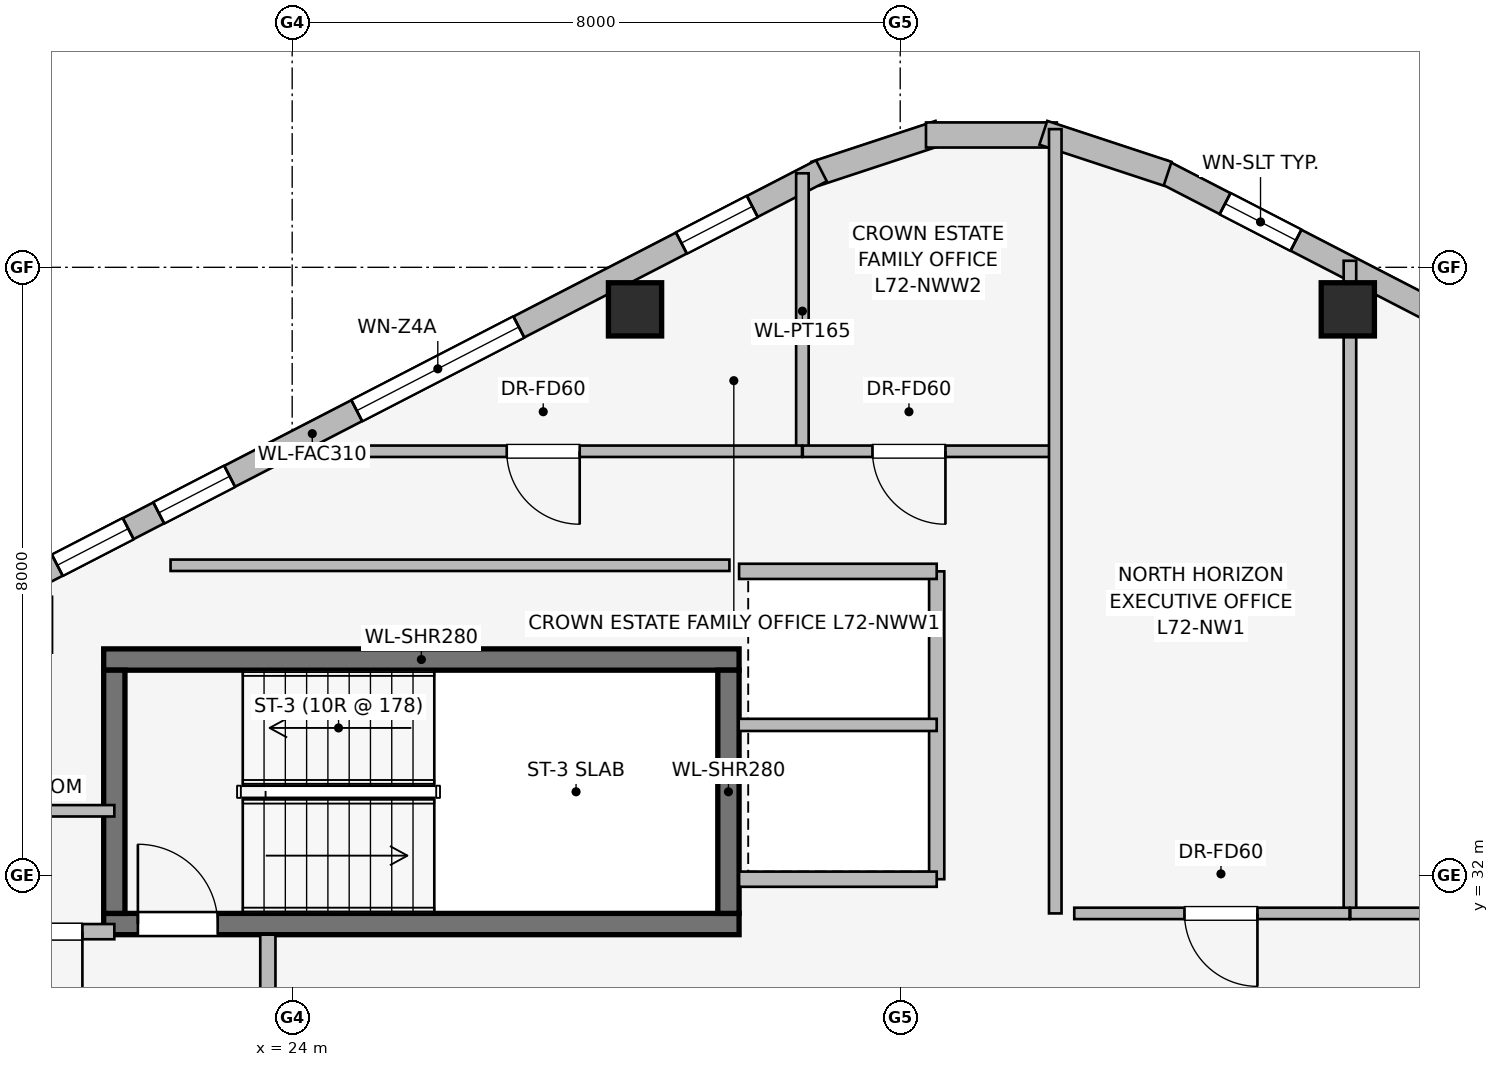
"""IFC4 building model, lengths in metres.
Left out: names, types, materials, properties, quantities, classifications, styles, units other than length and angle.
Written with IfcOpenShell. Run it as: python <this file> out.ifc"""

import sys

from ifc_helpers import new_model, si_unit, direction, frame, frame_2d, origin, origin_2d, place, context, subcontext, project, spatial, rectangle, extrude, element, fill, save


model = new_model("IFC4")
c1 = context("Model", 3, precision=1e-05, world=origin(), true_north=direction((0.0, 1.0)))
c2 = subcontext(c1, "Body", "Model", "MODEL_VIEW")
j1 = project(units=[si_unit("LENGTHUNIT", "METRE"), si_unit("PLANEANGLEUNIT", "RADIAN")], contexts=[c1])
p1 = place(None, origin())
s1 = spatial("IfcSite", under=j1, at=p1, CompositionType="ELEMENT")
p2 = place(p1, origin())
s2 = spatial("IfcBuilding", under=s1, at=p2, CompositionType="ELEMENT")
p3 = place(p2, frame((0.0, 0.0, 263.2)))
s3 = spatial("IfcBuildingStorey", under=s2, at=p3, CompositionType="ELEMENT", Elevation=263.2)
p4 = place(p3, frame((21.52, 31.36, 0.0), z_axis=(0.0, 0.0, 1.0), x_axis=(1.0, 0.0, 0.0)))
e1 = element("IfcWall", 1, at=p4, inside=s3, PredefinedType="SHEAR", context=c2, shape_type="SweptSolid", body=[
    extrude(rectangle(XDim=8.36, YDim=0.28, at=frame_2d((4.18, 0.0))), origin(), (0.0, 0.0, 1.0), 3.55),
])
p5 = place(p4, frame((0.45, 0.0, 0.0)))
e2 = element("IfcOpeningElement", 2, at=p5, cuts=e1, PredefinedType="OPENING", context=c2, shape_type="SweptSolid", body=[
    extrude(rectangle(XDim=1.05, YDim=2.0, at=frame_2d((0.525, 1.0))), frame((0.0, 0.15, 0.0), z_axis=(0.0, -1.0, 0.0), x_axis=(1.0, 0.0, 0.0)), (0.0, 0.0, 1.0), 0.3),
])
p6 = place(p3, frame((29.88, 34.84, 0.0), z_axis=(0.0, 0.0, 1.0), x_axis=(-1.0, 0.0, 0.0)))
e3 = element("IfcWall", 3, at=p6, inside=s3, PredefinedType="SHEAR", context=c2, shape_type="SweptSolid", body=[
    extrude(rectangle(XDim=8.36, YDim=0.28, at=frame_2d((4.18, 0.0))), origin(), (0.0, 0.0, 1.0), 3.55),
])
for number, where, z_axis, x_axis in (
    (4, (21.66, 34.7, 0.0), (0.0, 0.0, 1.0), (0.0, -1.0, 0.0)),
    (5, (29.74, 31.5, 0.0), (0.0, 0.0, 1.0), (0.0, 1.0, 0.0)),
):
    element("IfcWall", number, at=place(p3, frame(where, z_axis=z_axis, x_axis=x_axis)), inside=s3, PredefinedType="SHEAR", context=c2, shape_type="SweptSolid", body=[
        extrude(rectangle(XDim=3.2, YDim=0.28, at=frame_2d((1.6, 0.0))), origin(), (0.0, 0.0, 1.0), 3.55),
    ])
for number, where, z_axis, x_axis in (
    (6, (37.889, 39.447, 0.0), (0.0, 0.0, 1.0), (1.0, 0.0, 0.0)),
    (7, (28.511, 39.447, 0.0), (0.0, 0.0, 1.0), (1.0, 0.0, 0.0)),
):
    element("IfcColumn", number, at=place(p3, frame(where, z_axis=z_axis, x_axis=x_axis)), inside=s3, PredefinedType="COLUMN", context=c2, shape_type="SweptSolid", body=[
        extrude(rectangle(XDim=0.7, YDim=0.7, at=origin_2d()), origin(), (0.0, 0.0, 1.0), 3.55),
    ])
p7 = place(p3, frame((35.437, 41.27, 0.0), z_axis=(0.0, 0.0, 1.0), x_axis=(0.888581481622, -0.458718814218, 0.0)))
e8 = element("IfcWall", 8, at=p7, inside=s3, PredefinedType="STANDARD", context=c2, shape_type="SweptSolid", body=[
    extrude(rectangle(XDim=15.077, YDim=0.31, at=frame_2d((7.539, 0.0))), origin(), (0.0, 0.0, 1.0), 3.29),
])
p8 = place(p7, frame((0.942, 0.0, 0.75)))
e9 = element("IfcOpeningElement", 9, at=p8, cuts=e8, PredefinedType="OPENING", context=c2, shape_type="SweptSolid", body=[
    extrude(rectangle(XDim=1.05, YDim=1.4, at=frame_2d((0.525, 0.7))), frame((0.0, 0.165, 0.0), z_axis=(0.0, -1.0, 0.0), x_axis=(1.0, 0.0, 0.0)), (0.0, 0.0, 1.0), 0.33),
])
p9 = place(p7, frame((4.344, 0.0, 0.75)))
e10 = element("IfcOpeningElement", 10, at=p9, cuts=e8, PredefinedType="OPENING", context=c2, shape_type="SweptSolid", body=[
    extrude(rectangle(XDim=1.05, YDim=1.4, at=frame_2d((0.525, 0.7))), frame((0.0, 0.165, 0.0), z_axis=(0.0, -1.0, 0.0), x_axis=(1.0, 0.0, 0.0)), (0.0, 0.0, 1.0), 0.33),
])
p10 = place(p7, frame((7.013, 0.0, 0.75)))
e11 = element("IfcOpeningElement", 11, at=p10, cuts=e8, PredefinedType="OPENING", context=c2, shape_type="SweptSolid", body=[
    extrude(rectangle(XDim=1.05, YDim=1.4, at=frame_2d((0.525, 0.7))), frame((0.0, 0.165, 0.0), z_axis=(0.0, -1.0, 0.0), x_axis=(1.0, 0.0, 0.0)), (0.0, 0.0, 1.0), 0.33),
])
p11 = place(p7, frame((9.681, 0.0, 0.75)))
e12 = element("IfcOpeningElement", 12, at=p11, cuts=e8, PredefinedType="OPENING", context=c2, shape_type="SweptSolid", body=[
    extrude(rectangle(XDim=1.05, YDim=1.4, at=frame_2d((0.525, 0.7))), frame((0.0, 0.165, 0.0), z_axis=(0.0, -1.0, 0.0), x_axis=(1.0, 0.0, 0.0)), (0.0, 0.0, 1.0), 0.33),
])
p12 = place(p7, frame((13.029, 0.0, 0.75)))
e13 = element("IfcOpeningElement", 13, at=p12, cuts=e8, PredefinedType="OPENING", context=c2, shape_type="SweptSolid", body=[
    extrude(rectangle(XDim=1.05, YDim=1.4, at=frame_2d((0.525, 0.7))), frame((0.0, 0.165, 0.0), z_axis=(0.0, -1.0, 0.0), x_axis=(1.0, 0.0, 0.0)), (0.0, 0.0, 1.0), 0.33),
])
p13 = place(p3, frame((30.882, 41.231, 0.0), z_axis=(0.0, 0.0, 1.0), x_axis=(0.949713440491, 0.313120393699, 0.0)))
e14 = element("IfcWall", 14, at=p13, inside=s3, PredefinedType="STANDARD", context=c2, shape_type="SweptSolid", body=[
    extrude(rectangle(XDim=1.722, YDim=0.33, at=frame_2d((0.861, 0.0))), origin(), (0.0, 0.0, 1.0), 3.29),
])
p14 = place(p3, frame((32.339, 41.741, 0.0), z_axis=(0.0, 0.0, 1.0), x_axis=(1.0, 0.0, 0.0)))
e15 = element("IfcWall", 15, at=p14, inside=s3, PredefinedType="STANDARD", context=c2, shape_type="SweptSolid", body=[
    extrude(rectangle(XDim=1.722, YDim=0.33, at=frame_2d((0.861, 0.0))), origin(), (0.0, 0.0, 1.0), 3.29),
])
p15 = place(p3, frame((33.883, 41.77, 0.0), z_axis=(0.0, 0.0, 1.0), x_axis=(0.949713440491, -0.313120393699, 0.0)))
e16 = element("IfcWall", 16, at=p15, inside=s3, PredefinedType="STANDARD", context=c2, shape_type="SweptSolid", body=[
    extrude(rectangle(XDim=1.722, YDim=0.33, at=frame_2d((0.861, 0.0))), origin(), (0.0, 0.0, 1.0), 3.29),
])
p16 = place(p3, frame((17.566, 34.354, 0.0), z_axis=(0.0, 0.0, 1.0), x_axis=(0.888581481622, 0.458718814218, 0.0)))
e17 = element("IfcWall", 17, at=p16, inside=s3, PredefinedType="STANDARD", context=c2, shape_type="SweptSolid", body=[
    extrude(rectangle(XDim=15.077, YDim=0.31, at=frame_2d((7.539, 0.0))), origin(), (0.0, 0.0, 1.0), 3.29),
])
p17 = place(p16, frame((0.998, 0.0, 0.75)))
e18 = element("IfcOpeningElement", 18, at=p17, cuts=e17, PredefinedType="OPENING", context=c2, shape_type="SweptSolid", body=[
    extrude(rectangle(XDim=1.05, YDim=1.4, at=frame_2d((0.525, 0.7))), frame((0.0, 0.165, 0.0), z_axis=(0.0, -1.0, 0.0), x_axis=(1.0, 0.0, 0.0)), (0.0, 0.0, 1.0), 0.33),
])
p18 = place(p16, frame((3.763, 0.0, 0.75)))
e19 = element("IfcOpeningElement", 19, at=p18, cuts=e17, PredefinedType="OPENING", context=c2, shape_type="SweptSolid", body=[
    extrude(rectangle(XDim=1.05, YDim=1.4, at=frame_2d((0.525, 0.7))), frame((0.0, 0.165, 0.0), z_axis=(0.0, -1.0, 0.0), x_axis=(1.0, 0.0, 0.0)), (0.0, 0.0, 1.0), 0.33),
])
p19 = place(p16, frame((5.265, 0.0, 0.75)))
e20 = element("IfcOpeningElement", 20, at=p19, cuts=e17, PredefinedType="OPENING", context=c2, shape_type="SweptSolid", body=[
    extrude(rectangle(XDim=1.05, YDim=1.4, at=frame_2d((0.525, 0.7))), frame((0.0, 0.165, 0.0), z_axis=(0.0, -1.0, 0.0), x_axis=(1.0, 0.0, 0.0)), (0.0, 0.0, 1.0), 0.33),
])
p20 = place(p16, frame((8.197, 0.0, 0.75)))
e21 = element("IfcOpeningElement", 21, at=p20, cuts=e17, PredefinedType="OPENING", context=c2, shape_type="SweptSolid", body=[
    extrude(rectangle(XDim=2.4, YDim=1.6, at=frame_2d((1.2, 0.8))), frame((0.0, 0.165, 0.0), z_axis=(0.0, -1.0, 0.0), x_axis=(1.0, 0.0, 0.0)), (0.0, 0.0, 1.0), 0.33),
])
p21 = place(p16, frame((13.004, 0.0, 0.75)))
e22 = element("IfcOpeningElement", 22, at=p21, cuts=e17, PredefinedType="OPENING", context=c2, shape_type="SweptSolid", body=[
    extrude(rectangle(XDim=1.05, YDim=1.4, at=frame_2d((0.525, 0.7))), frame((0.0, 0.165, 0.0), z_axis=(0.0, -1.0, 0.0), x_axis=(1.0, 0.0, 0.0)), (0.0, 0.0, 1.0), 0.33),
])
p22 = place(p3, frame((23.68, 25.68, 0.0), z_axis=(0.0, 0.0, 1.0), x_axis=(0.0, 1.0, 0.0)))
e23 = element("IfcWall", 23, at=p22, inside=s3, PredefinedType="PARTITIONING", context=c2, shape_type="SweptSolid", body=[
    extrude(rectangle(XDim=5.54, YDim=0.2, at=frame_2d((2.77, 0.0))), origin(), (0.0, 0.0, 1.0), 3.29),
])
p23 = place(p22, frame((1.8, 0.0, 0.0)))
e24 = element("IfcOpeningElement", 24, at=p23, cuts=e23, PredefinedType="OPENING", context=c2, shape_type="SweptSolid", body=[
    extrude(rectangle(XDim=1.05, YDim=2.0, at=frame_2d((0.525, 1.0))), frame((0.0, 0.11, 0.0), z_axis=(0.0, -1.0, 0.0), x_axis=(1.0, 0.0, 0.0)), (0.0, 0.0, 1.0), 0.22),
])
p24 = place(p3, frame((21.66, 31.26, 0.0), z_axis=(0.0, 0.0, 1.0), x_axis=(-1.0, 0.0, 0.0)))
e25 = element("IfcWall", 25, at=p24, inside=s3, PredefinedType="PARTITIONING", context=c2, shape_type="SweptSolid", body=[
    extrude(rectangle(XDim=2.01, YDim=0.2, at=frame_2d((1.005, 0.0))), origin(), (0.0, 0.0, 1.0), 3.29),
])
p25 = place(p24, frame((0.42, 0.0, 0.0)))
e26 = element("IfcOpeningElement", 26, at=p25, cuts=e25, PredefinedType="OPENING", context=c2, shape_type="SweptSolid", body=[
    extrude(rectangle(XDim=0.86, YDim=2.0, at=frame_2d((0.43, 1.0))), frame((0.0, 0.11, 0.0), z_axis=(0.0, -1.0, 0.0), x_axis=(1.0, 0.0, 0.0)), (0.0, 0.0, 1.0), 0.22),
])
p26 = place(p3, frame((32.48, 31.95, 0.0), z_axis=(0.0, 0.0, 1.0), x_axis=(0.0, 1.0, 0.0)))
e27 = element("IfcWall", 27, at=p26, inside=s3, PredefinedType="PARTITIONING", context=c2, shape_type="SweptSolid", body=[
    extrude(rectangle(XDim=4.05, YDim=0.2, at=frame_2d((2.025, 0.0))), origin(), (0.0, 0.0, 1.0), 3.29),
])
for number, where, z_axis, x_axis in (
    (28, (29.88, 36.0, 0.0), (0.0, 0.0, 1.0), (1.0, 0.0, 0.0)),
    (29, (32.48, 31.95, 0.0), (0.0, 0.0, 1.0), (-1.0, 0.0, 0.0)),
):
    element("IfcWall", number, at=place(p3, frame(where, z_axis=z_axis, x_axis=x_axis)), inside=s3, PredefinedType="PARTITIONING", context=c2, shape_type="SweptSolid", body=[
        extrude(rectangle(XDim=2.6, YDim=0.2, at=frame_2d((1.3, 0.0))), origin(), (0.0, 0.0, 1.0), 3.29),
    ])
p27 = place(p3, frame((29.875, 33.98, 0.0), z_axis=(0.0, 0.0, 1.0), x_axis=(1.0, 0.0, 0.0)))
e30 = element("IfcWall", 30, at=p27, inside=s3, PredefinedType="PARTITIONING", context=c2, shape_type="SweptSolid", body=[
    extrude(rectangle(XDim=2.605, YDim=0.16, at=frame_2d((1.302, 0.0))), origin(), (0.0, 0.0, 1.0), 3.29),
])
p28 = place(p3, frame((21.66, 32.85, 0.0), z_axis=(0.0, 0.0, 1.0), x_axis=(-1.0, 0.0, 0.0)))
e31 = element("IfcWall", 31, at=p28, inside=s3, PredefinedType="PARTITIONING", context=c2, shape_type="SweptSolid", body=[
    extrude(rectangle(XDim=1.71, YDim=0.15, at=frame_2d((0.855, 0.0))), origin(), (0.0, 0.0, 1.0), 3.29),
])
p29 = place(p3, frame((30.713, 37.61, 0.0), z_axis=(0.0, 0.0, 1.0), x_axis=(0.0, 1.0, 0.0)))
e32 = element("IfcWall", 32, at=p29, inside=s3, PredefinedType="PARTITIONING", context=c2, shape_type="SweptSolid", body=[
    extrude(rectangle(XDim=3.627, YDim=0.165, at=frame_2d((1.813, 0.0))), origin(), (0.0, 0.0, 1.0), 3.29),
])
p30 = place(p3, frame((30.708, 37.58, 0.0), z_axis=(0.0, 0.0, 1.0), x_axis=(-1.0, 0.0, 0.0)))
e33 = element("IfcWall", 33, at=p30, inside=s3, PredefinedType="PARTITIONING", context=c2, shape_type="SweptSolid", body=[
    extrude(rectangle(XDim=7.046, YDim=0.15, at=frame_2d((3.523, 0.0))), origin(), (0.0, 0.0, 1.0), 2.682),
])
p31 = place(p30, frame((2.925, 0.0, 0.0)))
e34 = element("IfcOpeningElement", 34, at=p31, cuts=e33, PredefinedType="OPENING", context=c2, shape_type="SweptSolid", body=[
    extrude(rectangle(XDim=0.96, YDim=2.0, at=frame_2d((0.48, 1.0))), frame((0.0, 0.085, 0.0), z_axis=(0.0, -1.0, 0.0), x_axis=(1.0, 0.0, 0.0)), (0.0, 0.0, 1.0), 0.17),
])
p32 = place(p3, frame((33.962, 37.58, 0.0), z_axis=(0.0, 0.0, 1.0), x_axis=(-1.0, 0.0, 0.0)))
e35 = element("IfcWall", 35, at=p32, inside=s3, PredefinedType="PARTITIONING", context=c2, shape_type="SweptSolid", body=[
    extrude(rectangle(XDim=3.244, YDim=0.15, at=frame_2d((1.622, 0.0))), origin(), (0.0, 0.0, 1.0), 3.29),
])
p33 = place(p32, frame((1.367, 0.0, 0.0)))
e36 = element("IfcOpeningElement", 36, at=p33, cuts=e35, PredefinedType="OPENING", context=c2, shape_type="SweptSolid", body=[
    extrude(rectangle(XDim=0.96, YDim=2.0, at=frame_2d((0.48, 1.0))), frame((0.0, 0.085, 0.0), z_axis=(0.0, -1.0, 0.0), x_axis=(1.0, 0.0, 0.0)), (0.0, 0.0, 1.0), 0.17),
])
p34 = place(p3, frame((34.04, 31.5, 0.0), z_axis=(0.0, 0.0, 1.0), x_axis=(0.0, 1.0, 0.0)))
e37 = element("IfcWall", 37, at=p34, inside=s3, PredefinedType="PARTITIONING", context=c2, shape_type="SweptSolid", body=[
    extrude(rectangle(XDim=10.318, YDim=0.165, at=frame_2d((5.159, 0.0))), origin(), (0.0, 0.0, 1.0), 3.29),
])
p35 = place(p3, frame((37.917, 31.51, 0.0), z_axis=(0.0, 0.0, 1.0), x_axis=(0.0, 1.0, 0.0)))
e38 = element("IfcWall", 38, at=p35, inside=s3, PredefinedType="PARTITIONING", context=c2, shape_type="SweptSolid", body=[
    extrude(rectangle(XDim=8.576, YDim=0.165, at=frame_2d((4.288, 0.0))), origin(), (0.0, 0.0, 1.0), 2.679),
])
p36 = place(p3, frame((37.912, 31.5, 0.0), z_axis=(0.0, 0.0, 1.0), x_axis=(-1.0, 0.0, 0.0)))
e39 = element("IfcWall", 39, at=p36, inside=s3, PredefinedType="PARTITIONING", context=c2, shape_type="SweptSolid", body=[
    extrude(rectangle(XDim=3.622, YDim=0.15, at=frame_2d((1.811, 0.0))), origin(), (0.0, 0.0, 1.0), 3.29),
])
p37 = place(p36, frame((1.212, 0.0, 0.0)))
e40 = element("IfcOpeningElement", 40, at=p37, cuts=e39, PredefinedType="OPENING", context=c2, shape_type="SweptSolid", body=[
    extrude(rectangle(XDim=0.96, YDim=2.0, at=frame_2d((0.48, 1.0))), frame((0.0, 0.085, 0.0), z_axis=(0.0, -1.0, 0.0), x_axis=(1.0, 0.0, 0.0)), (0.0, 0.0, 1.0), 0.17),
])
p38 = place(p3, frame((41.45, 31.5, 0.0), z_axis=(0.0, 0.0, 1.0), x_axis=(-1.0, 0.0, 0.0)))
e41 = element("IfcWall", 41, at=p38, inside=s3, PredefinedType="PARTITIONING", context=c2, shape_type="SweptSolid", body=[
    extrude(rectangle(XDim=3.528, YDim=0.15, at=frame_2d((1.764, 0.0))), origin(), (0.0, 0.0, 1.0), 3.29),
])
p39 = place(p38, frame((1.524, 0.0, 0.0)))
e42 = element("IfcOpeningElement", 42, at=p39, cuts=e41, PredefinedType="OPENING", context=c2, shape_type="SweptSolid", body=[
    extrude(rectangle(XDim=0.96, YDim=2.0, at=frame_2d((0.48, 1.0))), frame((0.0, 0.085, 0.0), z_axis=(0.0, -1.0, 0.0), x_axis=(1.0, 0.0, 0.0)), (0.0, 0.0, 1.0), 0.17),
])
p40 = place(p3, frame((29.753, 36.08, 0.0), z_axis=(0.0, 0.0, 1.0), x_axis=(-1.0, 0.0, 0.0)))
e43 = element("IfcWall", 43, at=p40, inside=s3, PredefinedType="PARTITIONING", context=c2, shape_type="SweptSolid", body=[
    extrude(rectangle(XDim=7.353, YDim=0.15, at=frame_2d((3.677, 0.0))), origin(), (0.0, 0.0, 1.0), 2.682),
])
p41 = place(p8, origin())
e44 = element("IfcWindow", 44, at=p41, inside=s3, PartitioningType="SINGLE_PANEL", PredefinedType="WINDOW", context=c2, shape_type="SweptSolid", body=[
    extrude(rectangle(XDim=1.05, YDim=1.4, at=frame_2d((0.525, 0.7))), frame((0.0, 0.03, 0.0), z_axis=(0.0, -1.0, 0.0), x_axis=(1.0, 0.0, 0.0)), (0.0, 0.0, 1.0), 0.06),
])
fill(e9, e44)
p42 = place(p18, origin())
e45 = element("IfcWindow", 45, at=p42, inside=s3, PartitioningType="SINGLE_PANEL", PredefinedType="WINDOW", context=c2, shape_type="SweptSolid", body=[
    extrude(rectangle(XDim=1.05, YDim=1.4, at=frame_2d((0.525, 0.7))), frame((0.0, 0.03, 0.0), z_axis=(0.0, -1.0, 0.0), x_axis=(1.0, 0.0, 0.0)), (0.0, 0.0, 1.0), 0.06),
])
fill(e19, e45)
p43 = place(p19, origin())
e46 = element("IfcWindow", 46, at=p43, inside=s3, PartitioningType="SINGLE_PANEL", PredefinedType="WINDOW", context=c2, shape_type="SweptSolid", body=[
    extrude(rectangle(XDim=1.05, YDim=1.4, at=frame_2d((0.525, 0.7))), frame((0.0, 0.03, 0.0), z_axis=(0.0, -1.0, 0.0), x_axis=(1.0, 0.0, 0.0)), (0.0, 0.0, 1.0), 0.06),
])
fill(e20, e46)
p44 = place(p20, origin())
e47 = element("IfcWindow", 47, at=p44, inside=s3, PartitioningType="SINGLE_PANEL", PredefinedType="WINDOW", context=c2, shape_type="SweptSolid", body=[
    extrude(rectangle(XDim=2.4, YDim=1.6, at=frame_2d((1.2, 0.8))), frame((0.0, 0.03, 0.0), z_axis=(0.0, -1.0, 0.0), x_axis=(1.0, 0.0, 0.0)), (0.0, 0.0, 1.0), 0.06),
])
fill(e21, e47)
p45 = place(p21, origin())
e48 = element("IfcWindow", 48, at=p45, inside=s3, PartitioningType="SINGLE_PANEL", PredefinedType="WINDOW", context=c2, shape_type="SweptSolid", body=[
    extrude(rectangle(XDim=1.05, YDim=1.4, at=frame_2d((0.525, 0.7))), frame((0.0, 0.03, 0.0), z_axis=(0.0, -1.0, 0.0), x_axis=(1.0, 0.0, 0.0)), (0.0, 0.0, 1.0), 0.06),
])
fill(e22, e48)
p46 = place(p5, origin())
e49 = element("IfcDoor", 49, at=p46, inside=s3, OperationType="SINGLE_SWING_LEFT", PredefinedType="DOOR", context=c2, shape_type="SweptSolid", body=[
    extrude(rectangle(XDim=1.05, YDim=2.0, at=frame_2d((0.525, 1.0))), frame((0.0, 0.025, 0.0), z_axis=(0.0, -1.0, 0.0), x_axis=(1.0, 0.0, 0.0)), (0.0, 0.0, 1.0), 0.05),
])
fill(e2, e49)
p47 = place(p25, origin())
e50 = element("IfcDoor", 50, at=p47, inside=s3, OperationType="SINGLE_SWING_LEFT", PredefinedType="DOOR", context=c2, shape_type="SweptSolid", body=[
    extrude(rectangle(XDim=0.86, YDim=2.0, at=frame_2d((0.43, 1.0))), frame((0.0, 0.025, 0.0), z_axis=(0.0, -1.0, 0.0), x_axis=(1.0, 0.0, 0.0)), (0.0, 0.0, 1.0), 0.05),
])
fill(e26, e50)
p48 = place(p31, origin())
e51 = element("IfcDoor", 51, at=p48, inside=s3, OperationType="SINGLE_SWING_LEFT", PredefinedType="DOOR", context=c2, shape_type="SweptSolid", body=[
    extrude(rectangle(XDim=0.96, YDim=2.0, at=frame_2d((0.48, 1.0))), frame((0.0, 0.025, 0.0), z_axis=(0.0, -1.0, 0.0), x_axis=(1.0, 0.0, 0.0)), (0.0, 0.0, 1.0), 0.05),
])
fill(e34, e51)
p49 = place(p33, origin())
e52 = element("IfcDoor", 52, at=p49, inside=s3, OperationType="SINGLE_SWING_LEFT", PredefinedType="DOOR", context=c2, shape_type="SweptSolid", body=[
    extrude(rectangle(XDim=0.96, YDim=2.0, at=frame_2d((0.48, 1.0))), frame((0.0, 0.025, 0.0), z_axis=(0.0, -1.0, 0.0), x_axis=(1.0, 0.0, 0.0)), (0.0, 0.0, 1.0), 0.05),
])
fill(e36, e52)
p50 = place(p37, origin())
e53 = element("IfcDoor", 53, at=p50, inside=s3, OperationType="SINGLE_SWING_LEFT", PredefinedType="DOOR", context=c2, shape_type="SweptSolid", body=[
    extrude(rectangle(XDim=0.96, YDim=2.0, at=frame_2d((0.48, 1.0))), frame((0.0, 0.025, 0.0), z_axis=(0.0, -1.0, 0.0), x_axis=(1.0, 0.0, 0.0)), (0.0, 0.0, 1.0), 0.05),
])
fill(e40, e53)
save(model, sys.argv[1])
